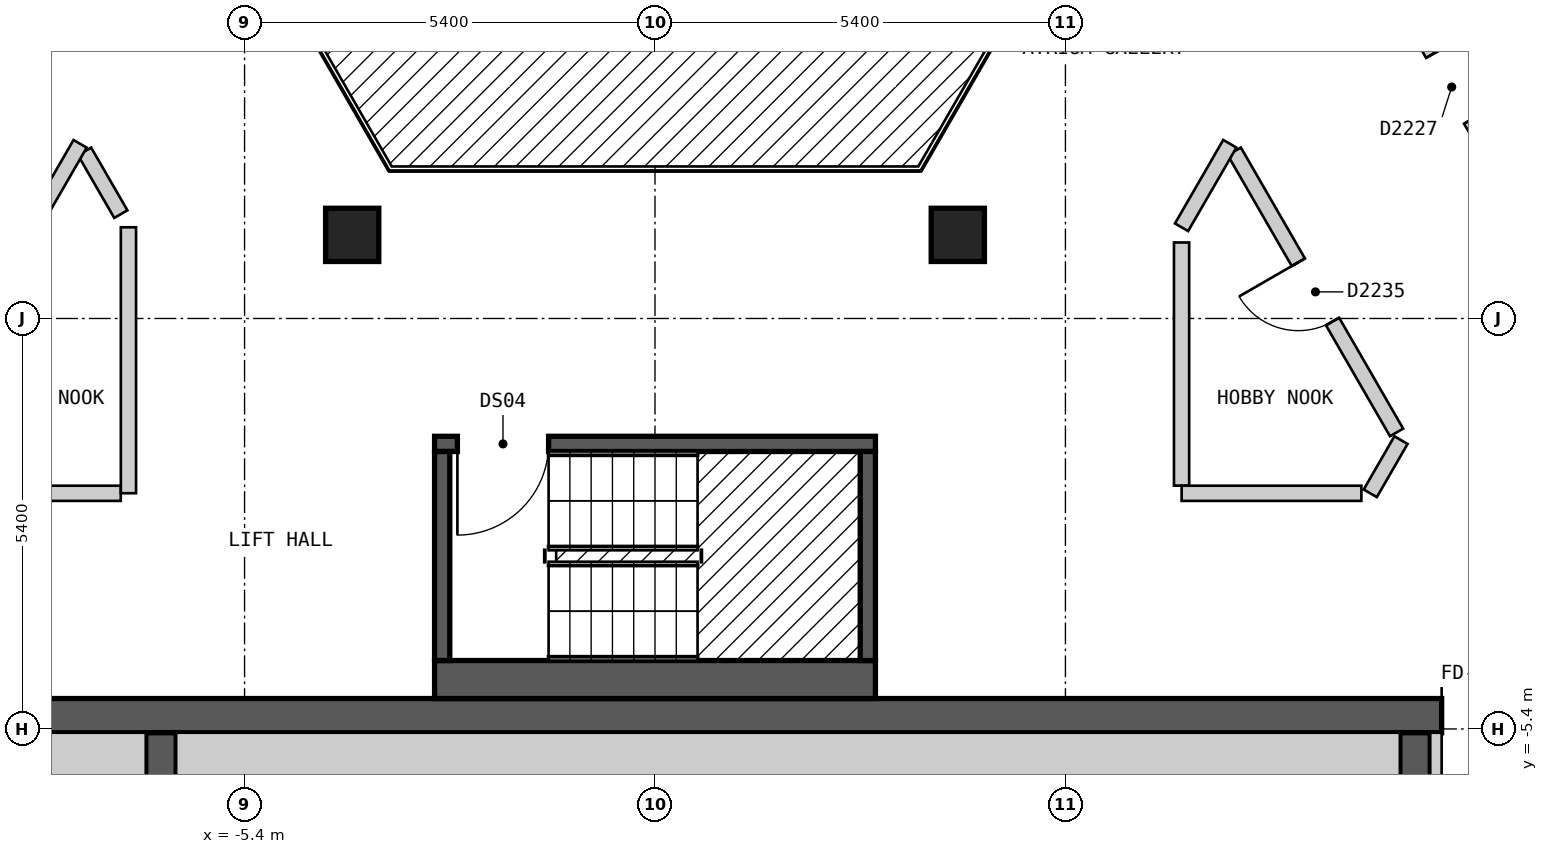
"""IFC4 building model, lengths in metres.
Left out: names, types, materials, properties, quantities, classifications, styles, units other than length and angle.
Written with IfcOpenShell. Run it as: python <this file> out.ifc"""

import sys

from ifc_helpers import new_model, si_unit, direction, frame, frame_2d, origin, origin_2d, place, context, subcontext, project, spatial, rectangle, extrude, element, fill, save


model = new_model("IFC4")
c1 = context("Model", 3, precision=1e-05, world=origin(), true_north=direction((0.0, 1.0)))
c2 = subcontext(c1, "Body", "Model", "MODEL_VIEW")
j1 = project(units=[si_unit("LENGTHUNIT", "METRE"), si_unit("PLANEANGLEUNIT", "RADIAN")], contexts=[c1])
p1 = place(None, origin())
s1 = spatial("IfcSite", under=j1, at=p1, CompositionType="ELEMENT")
p2 = place(p1, origin())
s2 = spatial("IfcBuilding", under=s1, at=p2, CompositionType="ELEMENT")
p3 = place(p2, frame((0.0, 0.0, 229.8)))
s3 = spatial("IfcBuildingStorey", under=s2, at=p3, CompositionType="ELEMENT", Elevation=229.8)
for number, where, z_axis, x_axis in (
    (1, (3.984, 1.1, 0.0), (0.0, 0.0, 1.0), (1.0, 0.0, 0.0)),
    (2, (-3.984, 1.1, 0.0), (0.0, 0.0, 1.0), (1.0, 0.0, 0.0)),
):
    element("IfcColumn", number, at=place(p3, frame(where, z_axis=z_axis, x_axis=x_axis)), inside=s3, PredefinedType="COLUMN", context=c2, shape_type="SweptSolid", body=[
        extrude(rectangle(XDim=0.7, YDim=0.7, at=origin_2d()), origin(), (0.0, 0.0, 1.0), 3.0),
    ])
p4 = place(p3, frame((-13.3, -5.225, 0.0), z_axis=(0.0, 0.0, 1.0), x_axis=(1.0, 0.0, 0.0)))
e3 = element("IfcWall", 3, at=p4, inside=s3, PredefinedType="SHEAR", context=c2, shape_type="SweptSolid", body=[
    extrude(rectangle(XDim=26.6, YDim=0.45, at=frame_2d((13.3, 0.0))), origin(), (0.0, 0.0, 1.0), 2.7),
])
p5 = place(p4, frame((23.65, 0.0, 0.0)))
e4 = element("IfcOpeningElement", 4, at=p5, cuts=e3, PredefinedType="OPENING", context=c2, shape_type="SweptSolid", body=[
    extrude(rectangle(XDim=1.2, YDim=2.1, at=frame_2d((0.6, 1.05))), frame((0.0, 0.235, 0.0), z_axis=(0.0, -1.0, 0.0), x_axis=(1.0, 0.0, 0.0)), (0.0, 0.0, 1.0), 0.47),
])
for number, where, z_axis, x_axis in (
    (5, (-6.5, -9.15, 0.0), (0.0, 0.0, 1.0), (0.0, 1.0, 0.0)),
    (6, (10.0, -9.15, 0.0), (0.0, 0.0, 1.0), (0.0, 1.0, 0.0)),
):
    element("IfcWall", number, at=place(p3, frame(where, z_axis=z_axis, x_axis=x_axis)), inside=s3, PredefinedType="SHEAR", context=c2, shape_type="SweptSolid", body=[
        extrude(rectangle(XDim=3.7, YDim=0.4, at=frame_2d((1.85, 0.0))), origin(), (0.0, 0.0, 1.0), 2.7),
    ])
p6 = place(p3, frame((-2.9, -4.75, 0.0), z_axis=(0.0, 0.0, 1.0), x_axis=(1.0, 0.0, 0.0)))
e7 = element("IfcWall", 7, at=p6, inside=s3, PredefinedType="SOLIDWALL", context=c2, shape_type="SweptSolid", body=[
    extrude(rectangle(XDim=5.8, YDim=0.5, at=frame_2d((2.9, 0.0))), origin(), (0.0, 0.0, 1.0), 2.7),
])
p7 = place(p3, frame((-2.9, -1.65, 0.0), z_axis=(0.0, 0.0, 1.0), x_axis=(1.0, 0.0, 0.0)))
e8 = element("IfcWall", 8, at=p7, inside=s3, PredefinedType="SOLIDWALL", context=c2, shape_type="SweptSolid", body=[
    extrude(rectangle(XDim=5.8, YDim=0.2, at=frame_2d((2.9, 0.0))), origin(), (0.0, 0.0, 1.0), 2.7),
])
p8 = place(p7, frame((0.3, 0.0, 0.0)))
e9 = element("IfcOpeningElement", 9, at=p8, cuts=e8, PredefinedType="OPENING", context=c2, shape_type="SweptSolid", body=[
    extrude(rectangle(XDim=1.2, YDim=2.1, at=frame_2d((0.6, 1.05))), frame((0.0, 0.11, 0.0), z_axis=(0.0, -1.0, 0.0), x_axis=(1.0, 0.0, 0.0)), (0.0, 0.0, 1.0), 0.22),
])
for number, where, z_axis, x_axis in (
    (10, (-2.8, -4.5, 0.0), (0.0, 0.0, 1.0), (0.0, 1.0, 0.0)),
    (11, (2.8, -4.5, 0.0), (0.0, 0.0, 1.0), (0.0, 1.0, 0.0)),
):
    element("IfcWall", number, at=place(p3, frame(where, z_axis=z_axis, x_axis=x_axis)), inside=s3, PredefinedType="SOLIDWALL", context=c2, shape_type="SweptSolid", body=[
        extrude(rectangle(XDim=2.75, YDim=0.2, at=frame_2d((1.375, 0.0))), origin(), (0.0, 0.0, 1.0), 2.7),
    ])
p9 = place(p3, frame((-7.505, 2.198, 0.0), z_axis=(0.0, 0.0, 1.0), x_axis=(0.500409926597, -0.865788603161, 0.0)))
e12 = element("IfcWall", 12, at=p9, inside=s3, PredefinedType="PARTITIONING", context=c2, shape_type="SweptSolid", body=[
    extrude(rectangle(XDim=0.953, YDim=0.2, at=frame_2d((0.477, 0.0))), origin(), (0.0, 0.0, 1.0), 2.7),
])
p10 = place(p3, frame((7.622, 2.199, 0.0), z_axis=(0.0, 0.0, 1.0), x_axis=(0.499994660107, -0.866028486751, 0.0)))
e13 = element("IfcWall", 13, at=p10, inside=s3, PredefinedType="PARTITIONING", context=c2, shape_type="SweptSolid", body=[
    extrude(rectangle(XDim=4.27, YDim=0.2, at=frame_2d((2.135, 0.0))), origin(), (0.0, 0.0, 1.0), 2.7),
])
p11 = place(p10, frame((1.685, 0.0, 0.0)))
e14 = element("IfcOpeningElement", 14, at=p11, cuts=e13, PredefinedType="OPENING", context=c2, shape_type="SweptSolid", body=[
    extrude(rectangle(XDim=0.9, YDim=2.1, at=frame_2d((0.45, 1.05))), frame((0.0, 0.11, 0.0), z_axis=(0.0, -1.0, 0.0), x_axis=(1.0, 0.0, 0.0)), (0.0, 0.0, 1.0), 0.22),
])
p12 = place(p3, frame((9.238, 5.2, 0.0), z_axis=(0.0, 0.0, 1.0), x_axis=(0.500025705601, -0.86601056214, 0.0)))
e15 = element("IfcWall", 15, at=p12, inside=s3, PredefinedType="PARTITIONING", context=c2, shape_type="SweptSolid", body=[
    extrude(rectangle(XDim=7.735, YDim=0.2, at=frame_2d((3.868, 0.0))), origin(), (0.0, 0.0, 1.0), 2.7),
])
p13 = place(p12, frame((6.898, 0.0, 0.0)))
e16 = element("IfcOpeningElement", 16, at=p13, cuts=e15, PredefinedType="OPENING", context=c2, shape_type="SweptSolid", body=[
    extrude(rectangle(XDim=0.8, YDim=2.1, at=frame_2d((0.4, 1.05))), frame((0.0, 0.11, 0.0), z_axis=(0.0, -1.0, 0.0), x_axis=(1.0, 0.0, 0.0)), (0.0, 0.0, 1.0), 0.22),
])
p14 = place(p12, frame((1.988, 0.0, 0.0)))
e17 = element("IfcOpeningElement", 17, at=p14, cuts=e15, PredefinedType="OPENING", context=c2, shape_type="SweptSolid", body=[
    extrude(rectangle(XDim=1.0, YDim=2.1, at=frame_2d((0.5, 1.05))), frame((0.0, 0.11, 0.0), z_axis=(0.0, -1.0, 0.0), x_axis=(1.0, 0.0, 0.0)), (0.0, 0.0, 1.0), 0.22),
])
p15 = place(p3, frame((6.928, 1.0, 0.0), z_axis=(0.0, 0.0, 1.0), x_axis=(0.0, -1.0, 0.0)))
e18 = element("IfcWall", 18, at=p15, inside=s3, PredefinedType="PARTITIONING", context=c2, shape_type="SweptSolid", body=[
    extrude(rectangle(XDim=3.199, YDim=0.2, at=frame_2d((1.6, 0.0))), origin(), (0.0, 0.0, 1.0), 2.7),
])
p16 = place(p3, frame((-9.41, -2.3, 0.0), z_axis=(0.0, 0.0, 1.0), x_axis=(1.0, 0.0, 0.0)))
e19 = element("IfcWall", 19, at=p16, inside=s3, PredefinedType="PARTITIONING", context=c2, shape_type="SweptSolid", body=[
    extrude(rectangle(XDim=2.381, YDim=0.2, at=frame_2d((1.19, 0.0))), origin(), (0.0, 0.0, 1.0), 2.7),
])
p17 = place(p3, frame((6.929, -2.3, 0.0), z_axis=(0.0, 0.0, 1.0), x_axis=(1.0, 0.0, 0.0)))
e20 = element("IfcWall", 20, at=p17, inside=s3, PredefinedType="PARTITIONING", context=c2, shape_type="SweptSolid", body=[
    extrude(rectangle(XDim=2.365, YDim=0.2, at=frame_2d((1.183, 0.0))), origin(), (0.0, 0.0, 1.0), 2.7),
])
p18 = place(p3, frame((6.928, 1.2, 0.0), z_axis=(0.0, 0.0, 1.0), x_axis=(0.500255167297, 0.865878032746, 0.0)))
e21 = element("IfcWall", 21, at=p18, inside=s3, PredefinedType="PARTITIONING", context=c2, shape_type="SweptSolid", body=[
    extrude(rectangle(XDim=1.269, YDim=0.2, at=frame_2d((0.635, 0.0))), origin(), (0.0, 0.0, 1.0), 2.7),
])
p19 = place(p3, frame((9.411, -2.3, 0.0), z_axis=(0.0, 0.0, 1.0), x_axis=(0.499940363534, 0.866059832176, 0.0)))
e22 = element("IfcWall", 22, at=p19, inside=s3, PredefinedType="PARTITIONING", context=c2, shape_type="SweptSolid", body=[
    extrude(rectangle(XDim=0.808, YDim=0.2, at=frame_2d((0.404, 0.0))), origin(), (0.0, 0.0, 1.0), 2.7),
])
p20 = place(p3, frame((-9.815, -1.6, 0.0), z_axis=(0.0, 0.0, 1.0), x_axis=(0.500058909736, 0.865991389561, 0.0)))
e23 = element("IfcWall", 23, at=p20, inside=s3, PredefinedType="PARTITIONING", context=c2, shape_type="SweptSolid", body=[
    extrude(rectangle(XDim=4.501, YDim=0.2, at=frame_2d((2.251, 0.0))), origin(), (0.0, 0.0, 1.0), 2.7),
])
p21 = place(p20, frame((1.801, 0.0, 0.0)))
e24 = element("IfcOpeningElement", 24, at=p21, cuts=e23, PredefinedType="OPENING", context=c2, shape_type="SweptSolid", body=[
    extrude(rectangle(XDim=0.9, YDim=2.1, at=frame_2d((0.45, 1.05))), frame((0.0, 0.11, 0.0), z_axis=(0.0, -1.0, 0.0), x_axis=(1.0, 0.0, 0.0)), (0.0, 0.0, 1.0), 0.22),
])
p22 = place(p3, frame((-6.928, -2.299, 0.0), z_axis=(0.0, 0.0, 1.0), x_axis=(0.0, 1.0, 0.0)))
e25 = element("IfcWall", 25, at=p22, inside=s3, PredefinedType="PARTITIONING", context=c2, shape_type="SweptSolid", body=[
    extrude(rectangle(XDim=3.499, YDim=0.2, at=frame_2d((1.75, 0.0))), origin(), (0.0, 0.0, 1.0), 2.7),
])
p23 = place(p3, frame((-12.1, -5.825, 0.0), z_axis=(0.0, 0.0, 1.0), x_axis=(1.0, 0.0, 0.0)))
e26 = element("IfcWall", 26, at=p23, inside=s3, PredefinedType="SOLIDWALL", context=c2, shape_type="SweptSolid", body=[
    extrude(rectangle(XDim=5.4, YDim=0.75, at=frame_2d((2.7, 0.0))), origin(), (0.0, 0.0, 1.0), 2.7),
])
p24 = place(p3, frame((-6.3, -5.825, 0.0), z_axis=(0.0, 0.0, 1.0), x_axis=(1.0, 0.0, 0.0)))
e27 = element("IfcWall", 27, at=p24, inside=s3, PredefinedType="SOLIDWALL", context=c2, shape_type="SweptSolid", body=[
    extrude(rectangle(XDim=16.1, YDim=0.75, at=frame_2d((8.05, 0.0))), origin(), (0.0, 0.0, 1.0), 2.7),
])
p25 = place(p3, frame((10.275, -6.2, 0.0), z_axis=(0.0, 0.0, 1.0), x_axis=(0.0, 1.0, 0.0)))
e28 = element("IfcWall", 28, at=p25, inside=s3, PredefinedType="PARTITIONING", context=c2, shape_type="SweptSolid", body=[
    extrude(rectangle(XDim=0.75, YDim=0.15, at=frame_2d((0.375, 0.0))), origin(), (0.0, 0.0, 1.0), 2.7),
])
p26 = place(p8, origin())
e29 = element("IfcDoor", 29, at=p26, inside=s3, OperationType="SINGLE_SWING_LEFT", PredefinedType="DOOR", context=c2, shape_type="SweptSolid", body=[
    extrude(rectangle(XDim=1.2, YDim=2.1, at=frame_2d((0.6, 1.05))), frame((0.0, 0.025, 0.0), z_axis=(0.0, -1.0, 0.0), x_axis=(1.0, 0.0, 0.0)), (0.0, 0.0, 1.0), 0.05),
])
fill(e9, e29)
p27 = place(p14, origin())
e30 = element("IfcDoor", 30, at=p27, inside=s3, OperationType="SINGLE_SWING_LEFT", PredefinedType="DOOR", context=c2, shape_type="SweptSolid", body=[
    extrude(rectangle(XDim=1.0, YDim=2.1, at=frame_2d((0.5, 1.05))), frame((0.0, 0.025, 0.0), z_axis=(0.0, -1.0, 0.0), x_axis=(1.0, 0.0, 0.0)), (0.0, 0.0, 1.0), 0.05),
])
fill(e17, e30)
p28 = place(p11, origin())
e31 = element("IfcDoor", 31, at=p28, inside=s3, OperationType="SINGLE_SWING_LEFT", PredefinedType="DOOR", context=c2, shape_type="SweptSolid", body=[
    extrude(rectangle(XDim=0.9, YDim=2.1, at=frame_2d((0.45, 1.05))), frame((0.0, 0.025, 0.0), z_axis=(0.0, -1.0, 0.0), x_axis=(1.0, 0.0, 0.0)), (0.0, 0.0, 1.0), 0.05),
])
fill(e14, e31)
p29 = place(p5, origin())
e32 = element("IfcDoor", 32, at=p29, inside=s3, OperationType="DOUBLE_DOOR_SINGLE_SWING", PredefinedType="DOOR", context=c2, shape_type="SweptSolid", body=[
    extrude(rectangle(XDim=1.2, YDim=2.1, at=frame_2d((0.6, 1.05))), frame((0.0, 0.025, 0.0), z_axis=(0.0, -1.0, 0.0), x_axis=(1.0, 0.0, 0.0)), (0.0, 0.0, 1.0), 0.05),
])
fill(e4, e32)
save(model, sys.argv[1])
